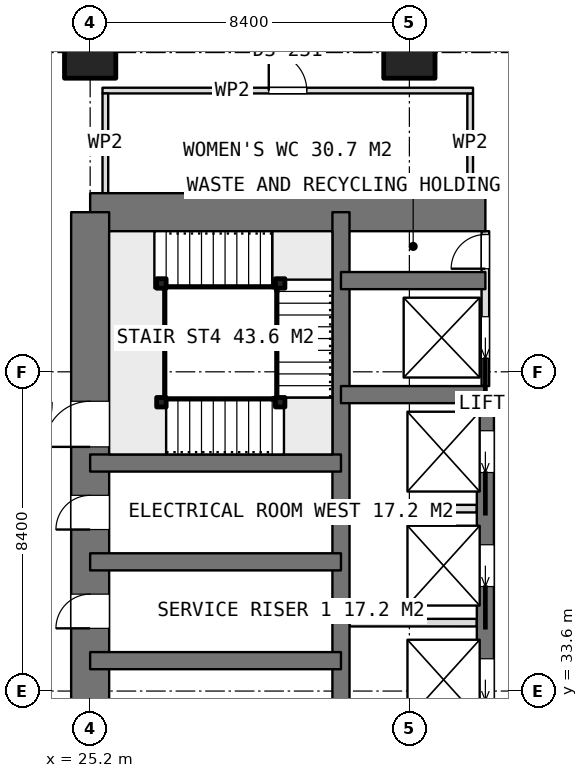
"""IFC4 building model, lengths in metres.
Left out: names, types, materials, properties, quantities, classifications, styles, units other than length and angle.
Written with IfcOpenShell. Run it as: python <this file> out.ifc"""

import sys

from ifc_helpers import new_model, si_unit, direction, frame, frame_2d, origin, origin_2d, place, context, subcontext, project, spatial, rectangle, extrude, element, fill, save


model = new_model("IFC4")
c1 = context("Model", 3, precision=1e-05, world=origin(), true_north=direction((0.0, 1.0)))
c2 = subcontext(c1, "Body", "Model", "MODEL_VIEW")
j1 = project(units=[si_unit("LENGTHUNIT", "METRE"), si_unit("PLANEANGLEUNIT", "RADIAN")], contexts=[c1])
p1 = place(None, origin())
s1 = spatial("IfcSite", under=j1, at=p1, CompositionType="ELEMENT")
p2 = place(p1, origin())
s2 = spatial("IfcBuilding", under=s1, at=p2, CompositionType="ELEMENT")
p3 = place(p2, frame((0.0, 0.0, 213.95)))
s3 = spatial("IfcBuildingStorey", under=s2, at=p3, CompositionType="ELEMENT", Elevation=213.95)
p4 = place(p3, frame((25.2, 46.2, 0.0), z_axis=(0.0, 0.0, 1.0), x_axis=(1.0, 0.0, 0.0)))
e1 = element("IfcWall", 1, at=p4, inside=s3, PredefinedType="SHEAR", context=c2, shape_type="SweptSolid", body=[
    extrude(rectangle(XDim=10.4, YDim=1.0, at=frame_2d((5.2, 0.0))), origin(), (0.0, 0.0, 1.0), 3.75),
])
p5 = place(p3, frame((25.2, 21.0, 0.0), z_axis=(0.0, 0.0, 1.0), x_axis=(0.0, 1.0, 0.0)))
e2 = element("IfcWall", 2, at=p5, inside=s3, PredefinedType="SHEAR", context=c2, shape_type="SweptSolid", body=[
    extrude(rectangle(XDim=25.2, YDim=1.0, at=frame_2d((12.6, 0.0))), origin(), (0.0, 0.0, 1.0), 3.75),
])
p6 = place(p5, frame((7.8, 0.0, 0.0)))
e3 = element("IfcOpeningElement", 3, at=p6, cuts=e2, PredefinedType="OPENING", context=c2, shape_type="SweptSolid", body=[
    extrude(rectangle(XDim=1.2, YDim=2.1, at=frame_2d((0.6, 1.05))), frame((0.0, 0.51, 0.0), z_axis=(0.0, -1.0, 0.0), x_axis=(1.0, 0.0, 0.0)), (0.0, 0.0, 1.0), 1.02),
])
p7 = place(p5, frame((14.25, 0.0, 0.0)))
e4 = element("IfcOpeningElement", 4, at=p7, cuts=e2, PredefinedType="OPENING", context=c2, shape_type="SweptSolid", body=[
    extrude(rectangle(XDim=0.9, YDim=2.1, at=frame_2d((0.45, 1.05))), frame((0.0, 0.51, 0.0), z_axis=(0.0, -1.0, 0.0), x_axis=(1.0, 0.0, 0.0)), (0.0, 0.0, 1.0), 1.02),
])
p8 = place(p5, frame((16.85, 0.0, 0.0)))
e5 = element("IfcOpeningElement", 5, at=p8, cuts=e2, PredefinedType="OPENING", context=c2, shape_type="SweptSolid", body=[
    extrude(rectangle(XDim=0.9, YDim=2.1, at=frame_2d((0.45, 1.05))), frame((0.0, 0.51, 0.0), z_axis=(0.0, -1.0, 0.0), x_axis=(1.0, 0.0, 0.0)), (0.0, 0.0, 1.0), 1.02),
])
p9 = place(p5, frame((19.025, 0.0, 0.0)))
e6 = element("IfcOpeningElement", 6, at=p9, cuts=e2, PredefinedType="OPENING", context=c2, shape_type="SweptSolid", body=[
    extrude(rectangle(XDim=1.2, YDim=2.1, at=frame_2d((0.6, 1.05))), frame((0.0, 0.51, 0.0), z_axis=(0.0, -1.0, 0.0), x_axis=(1.0, 0.0, 0.0)), (0.0, 0.0, 1.0), 1.02),
])
p10 = place(p3, frame((31.8, 21.0, 0.0), z_axis=(0.0, 0.0, 1.0), x_axis=(0.0, 1.0, 0.0)))
e7 = element("IfcWall", 7, at=p10, inside=s3, PredefinedType="SHEAR", context=c2, shape_type="SweptSolid", body=[
    extrude(rectangle(XDim=25.2, YDim=0.45, at=frame_2d((12.6, 0.0))), origin(), (0.0, 0.0, 1.0), 3.75),
])
p11 = place(p3, frame((35.6, 23.4, 0.0), z_axis=(0.0, 0.0, 1.0), x_axis=(0.0, 1.0, 0.0)))
e8 = element("IfcWall", 8, at=p11, inside=s3, PredefinedType="SHEAR", context=c2, shape_type="SweptSolid", body=[
    extrude(rectangle(XDim=18.0, YDim=0.45, at=frame_2d((9.0, 0.0))), origin(), (0.0, 0.0, 1.0), 3.75),
])
p12 = place(p11, frame((0.95, 0.0, 0.0)))
e9 = element("IfcOpeningElement", 9, at=p12, cuts=e8, PredefinedType="OPENING", context=c2, shape_type="SweptSolid", body=[
    extrude(rectangle(XDim=1.1, YDim=2.1, at=frame_2d((0.55, 1.05))), frame((0.0, 0.235, 0.0), z_axis=(0.0, -1.0, 0.0), x_axis=(1.0, 0.0, 0.0)), (0.0, 0.0, 1.0), 0.47),
])
p13 = place(p11, frame((3.95, 0.0, 0.0)))
e10 = element("IfcOpeningElement", 10, at=p13, cuts=e8, PredefinedType="OPENING", context=c2, shape_type="SweptSolid", body=[
    extrude(rectangle(XDim=1.1, YDim=2.1, at=frame_2d((0.55, 1.05))), frame((0.0, 0.235, 0.0), z_axis=(0.0, -1.0, 0.0), x_axis=(1.0, 0.0, 0.0)), (0.0, 0.0, 1.0), 0.47),
])
p14 = place(p11, frame((6.95, 0.0, 0.0)))
e11 = element("IfcOpeningElement", 11, at=p14, cuts=e8, PredefinedType="OPENING", context=c2, shape_type="SweptSolid", body=[
    extrude(rectangle(XDim=1.1, YDim=2.1, at=frame_2d((0.55, 1.05))), frame((0.0, 0.235, 0.0), z_axis=(0.0, -1.0, 0.0), x_axis=(1.0, 0.0, 0.0)), (0.0, 0.0, 1.0), 0.47),
])
p15 = place(p11, frame((9.95, 0.0, 0.0)))
e12 = element("IfcOpeningElement", 12, at=p15, cuts=e8, PredefinedType="OPENING", context=c2, shape_type="SweptSolid", body=[
    extrude(rectangle(XDim=1.1, YDim=2.1, at=frame_2d((0.55, 1.05))), frame((0.0, 0.235, 0.0), z_axis=(0.0, -1.0, 0.0), x_axis=(1.0, 0.0, 0.0)), (0.0, 0.0, 1.0), 0.47),
])
p16 = place(p11, frame((12.95, 0.0, 0.0)))
e13 = element("IfcOpeningElement", 13, at=p16, cuts=e8, PredefinedType="OPENING", context=c2, shape_type="SweptSolid", body=[
    extrude(rectangle(XDim=1.1, YDim=2.1, at=frame_2d((0.55, 1.05))), frame((0.0, 0.235, 0.0), z_axis=(0.0, -1.0, 0.0), x_axis=(1.0, 0.0, 0.0)), (0.0, 0.0, 1.0), 0.47),
])
p17 = place(p11, frame((15.95, 0.0, 0.0)))
e14 = element("IfcOpeningElement", 14, at=p17, cuts=e8, PredefinedType="OPENING", context=c2, shape_type="SweptSolid", body=[
    extrude(rectangle(XDim=1.1, YDim=2.1, at=frame_2d((0.55, 1.05))), frame((0.0, 0.235, 0.0), z_axis=(0.0, -1.0, 0.0), x_axis=(1.0, 0.0, 0.0)), (0.0, 0.0, 1.0), 0.47),
])
for number, where, z_axis, x_axis in (
    (15, (31.8, 41.4, 0.0), (0.0, 0.0, 1.0), (1.0, 0.0, 0.0)),
    (16, (31.8, 44.4, 0.0), (0.0, 0.0, 1.0), (1.0, 0.0, 0.0)),
):
    element("IfcWall", number, at=place(p3, frame(where, z_axis=z_axis, x_axis=x_axis)), inside=s3, PredefinedType="SHEAR", context=c2, shape_type="SweptSolid", body=[
        extrude(rectangle(XDim=3.8, YDim=0.45, at=frame_2d((1.9, 0.0))), origin(), (0.0, 0.0, 1.0), 3.75),
    ])
for number, where, z_axis, x_axis in (
    (17, (25.2, 34.4, 0.0), (0.0, 0.0, 1.0), (1.0, 0.0, 0.0)),
    (18, (25.2, 37.0, 0.0), (0.0, 0.0, 1.0), (1.0, 0.0, 0.0)),
    (19, (25.2, 39.6, 0.0), (0.0, 0.0, 1.0), (1.0, 0.0, 0.0)),
):
    element("IfcWall", number, at=place(p3, frame(where, z_axis=z_axis, x_axis=x_axis)), inside=s3, PredefinedType="SHEAR", context=c2, shape_type="SweptSolid", body=[
        extrude(rectangle(XDim=6.6, YDim=0.45, at=frame_2d((3.3, 0.0))), origin(), (0.0, 0.0, 1.0), 3.75),
    ])
for number, where, z_axis, x_axis in (
    (20, (25.2, 50.4, 0.0), (0.0, 0.0, 1.0), (1.0, 0.0, 0.0)),
    (21, (33.6, 50.4, 0.0), (0.0, 0.0, 1.0), (1.0, 0.0, 0.0)),
):
    element("IfcColumn", number, at=place(p3, frame(where, z_axis=z_axis, x_axis=x_axis)), inside=s3, PredefinedType="COLUMN", context=c2, shape_type="SweptSolid", body=[
        extrude(rectangle(XDim=1.35, YDim=1.35, at=origin_2d()), origin(), (0.0, 0.0, 1.0), 3.75),
    ])
for number, where, z_axis, x_axis in (
    (22, (32.025, 35.4, 0.0), (0.0, 0.0, 1.0), (1.0, 0.0, 0.0)),
    (23, (32.025, 38.4, 0.0), (0.0, 0.0, 1.0), (1.0, 0.0, 0.0)),
):
    element("IfcWall", number, at=place(p3, frame(where, z_axis=z_axis, x_axis=x_axis)), inside=s3, PredefinedType="PARTITIONING", context=c2, shape_type="SweptSolid", body=[
        extrude(rectangle(XDim=3.35, YDim=0.2, at=frame_2d((1.675, 0.0))), origin(), (0.0, 0.0, 1.0), 3.5),
    ])
p18 = place(p3, frame((35.6, 41.625, 0.0), z_axis=(0.0, 0.0, 1.0), x_axis=(0.0, 1.0, 0.0)))
e24 = element("IfcWall", 24, at=p18, inside=s3, PredefinedType="PARTITIONING", context=c2, shape_type="SweptSolid", body=[
    extrude(rectangle(XDim=4.075, YDim=0.2, at=frame_2d((2.038, 0.0))), origin(), (0.0, 0.0, 1.0), 3.5),
])
p19 = place(p18, frame((3.088, 0.0, 0.0)))
e25 = element("IfcOpeningElement", 25, at=p19, cuts=e24, PredefinedType="OPENING", context=c2, shape_type="SweptSolid", body=[
    extrude(rectangle(XDim=0.9, YDim=2.1, at=frame_2d((0.45, 1.05))), frame((0.0, 0.11, 0.0), z_axis=(0.0, -1.0, 0.0), x_axis=(1.0, 0.0, 0.0)), (0.0, 0.0, 1.0), 0.22),
])
p20 = place(p18, frame((0.725, 0.0, 0.0)))
e26 = element("IfcOpeningElement", 26, at=p20, cuts=e24, PredefinedType="OPENING", context=c2, shape_type="SweptSolid", body=[
    extrude(rectangle(XDim=1.1, YDim=2.1, at=frame_2d((0.55, 1.05))), frame((0.0, 0.11, 0.0), z_axis=(0.0, -1.0, 0.0), x_axis=(1.0, 0.0, 0.0)), (0.0, 0.0, 1.0), 0.22),
])
p21 = place(p3, frame((25.525, 49.4, 0.0), z_axis=(0.0, 0.0, 1.0), x_axis=(1.0, 0.0, 0.0)))
e27 = element("IfcWall", 27, at=p21, inside=s3, PredefinedType="PARTITIONING", context=c2, shape_type="SweptSolid", body=[
    extrude(rectangle(XDim=9.75, YDim=0.15, at=frame_2d((4.875, 0.0))), origin(), (0.0, 0.0, 1.0), 3.5),
])
p22 = place(p21, frame((4.375, 0.0, 0.0)))
e28 = element("IfcOpeningElement", 28, at=p22, cuts=e27, PredefinedType="OPENING", context=c2, shape_type="SweptSolid", body=[
    extrude(rectangle(XDim=1.0, YDim=2.1, at=frame_2d((0.5, 1.05))), frame((0.0, 0.085, 0.0), z_axis=(0.0, -1.0, 0.0), x_axis=(1.0, 0.0, 0.0)), (0.0, 0.0, 1.0), 0.17),
])
for number, where, z_axis, x_axis in (
    (29, (25.6, 46.7, 0.0), (0.0, 0.0, 1.0), (0.0, 1.0, 0.0)),
    (30, (35.2, 46.7, 0.0), (0.0, 0.0, 1.0), (0.0, 1.0, 0.0)),
):
    element("IfcWall", number, at=place(p3, frame(where, z_axis=z_axis, x_axis=x_axis)), inside=s3, PredefinedType="PARTITIONING", context=c2, shape_type="SweptSolid", body=[
        extrude(rectangle(XDim=2.625, YDim=0.15, at=frame_2d((1.312, 0.0))), origin(), (0.0, 0.0, 1.0), 3.5),
    ])
for number, where, z_axis, x_axis in (
    (31, (27.075, 41.2, 0.0), (0.0, 0.0, 1.0), (1.0, 0.0, 0.0)),
    (32, (30.2, 41.2, 0.0), (0.0, 0.0, 1.0), (1.0, 0.0, 0.0)),
    (33, (30.2, 44.325, 0.0), (0.0, 0.0, 1.0), (1.0, 0.0, 0.0)),
    (34, (27.075, 44.325, 0.0), (0.0, 0.0, 1.0), (1.0, 0.0, 0.0)),
):
    element("IfcColumn", number, at=place(p3, frame(where, z_axis=z_axis, x_axis=x_axis)), inside=s3, PredefinedType="COLUMN", context=c2, shape_type="SweptSolid", body=[
        extrude(rectangle(XDim=0.25, YDim=0.25, at=origin_2d()), origin(), (0.0, 0.0, 1.0), 3.75),
    ])
p23 = place(p7, origin())
e35 = element("IfcDoor", 35, at=p23, inside=s3, OperationType="SINGLE_SWING_LEFT", PredefinedType="DOOR", context=c2, shape_type="SweptSolid", body=[
    extrude(rectangle(XDim=0.9, YDim=2.1, at=frame_2d((0.45, 1.05))), frame((0.0, 0.025, 0.0), z_axis=(0.0, -1.0, 0.0), x_axis=(1.0, 0.0, 0.0)), (0.0, 0.0, 1.0), 0.05),
])
fill(e4, e35)
p24 = place(p8, origin())
e36 = element("IfcDoor", 36, at=p24, inside=s3, OperationType="SINGLE_SWING_LEFT", PredefinedType="DOOR", context=c2, shape_type="SweptSolid", body=[
    extrude(rectangle(XDim=0.9, YDim=2.1, at=frame_2d((0.45, 1.05))), frame((0.0, 0.025, 0.0), z_axis=(0.0, -1.0, 0.0), x_axis=(1.0, 0.0, 0.0)), (0.0, 0.0, 1.0), 0.05),
])
fill(e5, e36)
p25 = place(p19, origin())
e37 = element("IfcDoor", 37, at=p25, inside=s3, OperationType="SINGLE_SWING_LEFT", PredefinedType="DOOR", context=c2, shape_type="SweptSolid", body=[
    extrude(rectangle(XDim=0.9, YDim=2.1, at=frame_2d((0.45, 1.05))), frame((0.0, 0.025, 0.0), z_axis=(0.0, -1.0, 0.0), x_axis=(1.0, 0.0, 0.0)), (0.0, 0.0, 1.0), 0.05),
])
fill(e25, e37)
p26 = place(p15, origin())
e38 = element("IfcDoor", 38, at=p26, inside=s3, OperationType="SLIDING_TO_LEFT", PredefinedType="USERDEFINED", context=c2, shape_type="SweptSolid", body=[
    extrude(rectangle(XDim=1.1, YDim=2.1, at=frame_2d((0.55, 1.05))), frame((0.0, 0.025, 0.0), z_axis=(0.0, -1.0, 0.0), x_axis=(1.0, 0.0, 0.0)), (0.0, 0.0, 1.0), 0.05),
])
fill(e12, e38)
p27 = place(p16, origin())
e39 = element("IfcDoor", 39, at=p27, inside=s3, OperationType="SLIDING_TO_LEFT", PredefinedType="USERDEFINED", context=c2, shape_type="SweptSolid", body=[
    extrude(rectangle(XDim=1.1, YDim=2.1, at=frame_2d((0.55, 1.05))), frame((0.0, 0.025, 0.0), z_axis=(0.0, -1.0, 0.0), x_axis=(1.0, 0.0, 0.0)), (0.0, 0.0, 1.0), 0.05),
])
fill(e13, e39)
p28 = place(p17, origin())
e40 = element("IfcDoor", 40, at=p28, inside=s3, OperationType="SLIDING_TO_LEFT", PredefinedType="USERDEFINED", context=c2, shape_type="SweptSolid", body=[
    extrude(rectangle(XDim=1.1, YDim=2.1, at=frame_2d((0.55, 1.05))), frame((0.0, 0.025, 0.0), z_axis=(0.0, -1.0, 0.0), x_axis=(1.0, 0.0, 0.0)), (0.0, 0.0, 1.0), 0.05),
])
fill(e14, e40)
p29 = place(p20, origin())
e41 = element("IfcDoor", 41, at=p29, inside=s3, OperationType="SLIDING_TO_LEFT", PredefinedType="USERDEFINED", context=c2, shape_type="SweptSolid", body=[
    extrude(rectangle(XDim=1.1, YDim=2.1, at=frame_2d((0.55, 1.05))), frame((0.0, 0.025, 0.0), z_axis=(0.0, -1.0, 0.0), x_axis=(1.0, 0.0, 0.0)), (0.0, 0.0, 1.0), 0.05),
])
fill(e26, e41)
p30 = place(p22, origin())
e42 = element("IfcDoor", 42, at=p30, inside=s3, OperationType="SINGLE_SWING_LEFT", PredefinedType="DOOR", context=c2, shape_type="SweptSolid", body=[
    extrude(rectangle(XDim=1.0, YDim=2.1, at=frame_2d((0.5, 1.05))), frame((0.0, 0.025, 0.0), z_axis=(0.0, -1.0, 0.0), x_axis=(1.0, 0.0, 0.0)), (0.0, 0.0, 1.0), 0.05),
])
fill(e28, e42)
p31 = place(p9, origin())
e43 = element("IfcDoor", 43, at=p31, inside=s3, OperationType="SINGLE_SWING_RIGHT", PredefinedType="DOOR", context=c2, shape_type="SweptSolid", body=[
    extrude(rectangle(XDim=1.2, YDim=2.1, at=frame_2d((0.6, 1.05))), frame((0.0, 0.025, 0.0), z_axis=(0.0, -1.0, 0.0), x_axis=(1.0, 0.0, 0.0)), (0.0, 0.0, 1.0), 0.05),
])
fill(e6, e43)
save(model, sys.argv[1])
